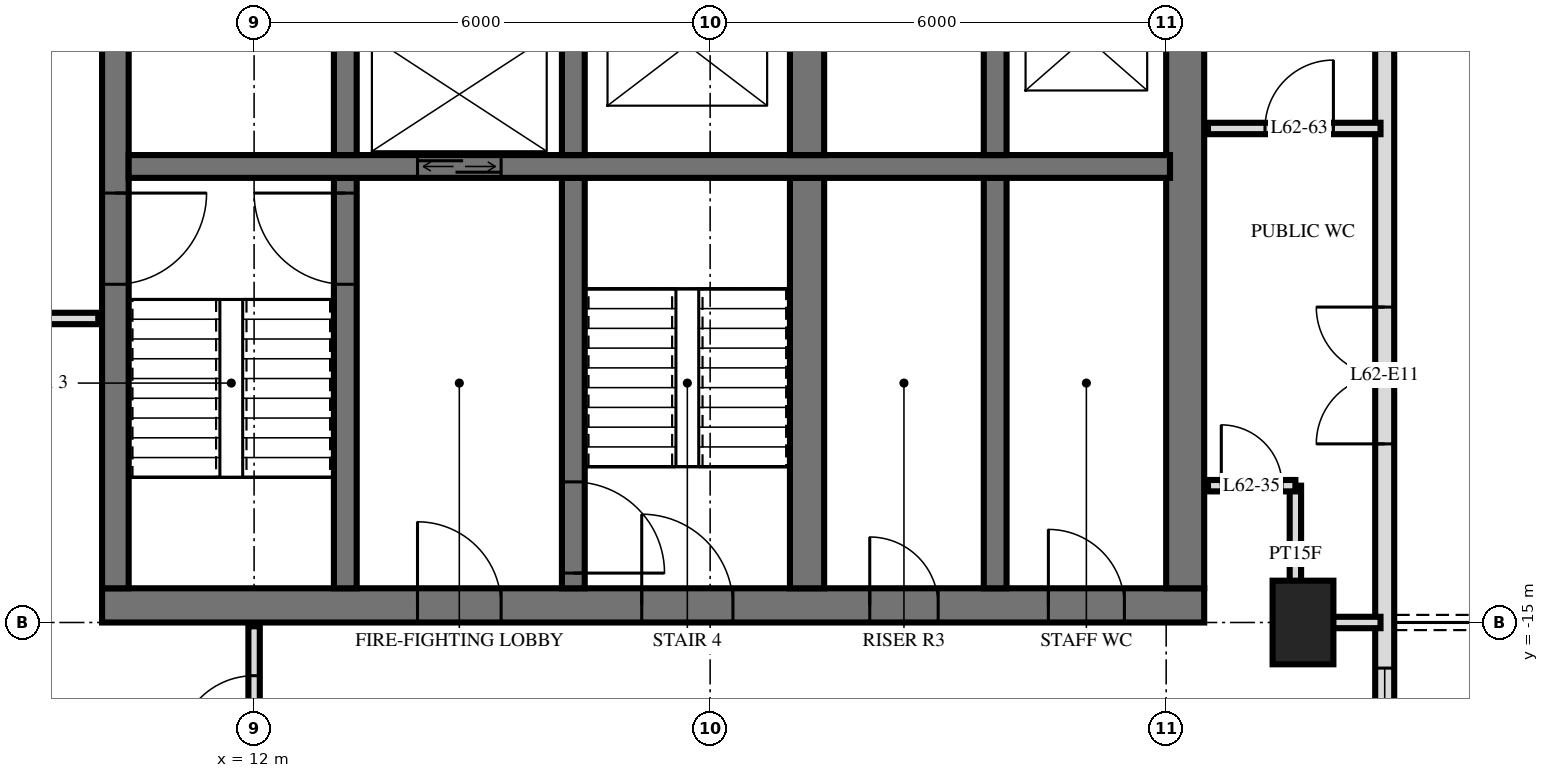
"""IFC4 building model, lengths in metres.
Left out: names, types, materials, properties, quantities, classifications, styles, units other than length and angle.
Written with IfcOpenShell. Run it as: python <this file> out.ifc"""

import sys

from ifc_helpers import new_model, si_unit, direction, frame, frame_2d, origin, origin_2d, place, context, subcontext, project, spatial, rectangle, extrude, element, fill, save


model = new_model("IFC4")
c1 = context("Model", 3, precision=1e-05, world=origin(), true_north=direction((0.0, 1.0)))
c2 = subcontext(c1, "Body", "Model", "MODEL_VIEW")
j1 = project(units=[si_unit("LENGTHUNIT", "METRE"), si_unit("PLANEANGLEUNIT", "RADIAN")], contexts=[c1])
p1 = place(None, origin())
s1 = spatial("IfcSite", under=j1, at=p1, CompositionType="ELEMENT")
p2 = place(p1, origin())
s2 = spatial("IfcBuilding", under=s1, at=p2, CompositionType="ELEMENT")
p3 = place(p2, frame((0.0, 0.0, 236.1)))
s3 = spatial("IfcBuildingStorey", under=s2, at=p3, CompositionType="ELEMENT", Elevation=236.1)
p4 = place(p3, frame((25.8, -15.0, 0.0), z_axis=(0.0, 0.0, 1.0), x_axis=(0.0, 1.0, 0.0)))
e1 = element("IfcColumn", 1, at=p4, inside=s3, PredefinedType="COLUMN", context=c2, shape_type="SweptSolid", body=[
    extrude(rectangle(XDim=1.1, YDim=0.8, at=origin_2d()), origin(), (0.0, 0.0, 1.0), 3.5),
])
p5 = place(p3, frame((10.0, -14.775, 0.0), z_axis=(0.0, 0.0, 1.0), x_axis=(1.0, 0.0, 0.0)))
e2 = element("IfcWall", 2, at=p5, inside=s3, PredefinedType="SHEAR", context=c2, shape_type="SweptSolid", body=[
    extrude(rectangle(XDim=14.5, YDim=0.45, at=frame_2d((7.25, 0.0))), origin(), (0.0, 0.0, 1.0), 3.5),
])
p6 = place(p5, frame((7.1, 0.0, 0.0)))
e3 = element("IfcOpeningElement", 3, at=p6, cuts=e2, PredefinedType="OPENING", context=c2, shape_type="SweptSolid", body=[
    extrude(rectangle(XDim=1.2, YDim=2.1, at=frame_2d((0.6, 1.05))), frame((0.0, 0.235, 0.0), z_axis=(0.0, -1.0, 0.0), x_axis=(1.0, 0.0, 0.0)), (0.0, 0.0, 1.0), 0.47),
])
p7 = place(p5, frame((4.15, 0.0, 0.0)))
e4 = element("IfcOpeningElement", 4, at=p7, cuts=e2, PredefinedType="OPENING", context=c2, shape_type="SweptSolid", body=[
    extrude(rectangle(XDim=1.1, YDim=2.1, at=frame_2d((0.55, 1.05))), frame((0.0, 0.235, 0.0), z_axis=(0.0, -1.0, 0.0), x_axis=(1.0, 0.0, 0.0)), (0.0, 0.0, 1.0), 0.47),
])
p8 = place(p5, frame((10.1, 0.0, 0.0)))
e5 = element("IfcOpeningElement", 5, at=p8, cuts=e2, PredefinedType="OPENING", context=c2, shape_type="SweptSolid", body=[
    extrude(rectangle(XDim=0.9, YDim=2.1, at=frame_2d((0.45, 1.05))), frame((0.0, 0.235, 0.0), z_axis=(0.0, -1.0, 0.0), x_axis=(1.0, 0.0, 0.0)), (0.0, 0.0, 1.0), 0.47),
])
p9 = place(p5, frame((12.45, 0.0, 0.0)))
e6 = element("IfcOpeningElement", 6, at=p9, cuts=e2, PredefinedType="OPENING", context=c2, shape_type="SweptSolid", body=[
    extrude(rectangle(XDim=1.0, YDim=2.1, at=frame_2d((0.5, 1.05))), frame((0.0, 0.235, 0.0), z_axis=(0.0, -1.0, 0.0), x_axis=(1.0, 0.0, 0.0)), (0.0, 0.0, 1.0), 0.47),
])
p10 = place(p3, frame((10.175, -14.55, 0.0), z_axis=(0.0, 0.0, 1.0), x_axis=(0.0, 1.0, 0.0)))
e7 = element("IfcWall", 7, at=p10, inside=s3, PredefinedType="SHEAR", context=c2, shape_type="SweptSolid", body=[
    extrude(rectangle(XDim=14.1, YDim=0.35, at=frame_2d((7.05, 0.0))), origin(), (0.0, 0.0, 1.0), 3.5),
])
p11 = place(p10, frame((8.4, 0.0, 0.0)))
e8 = element("IfcOpeningElement", 8, at=p11, cuts=e7, PredefinedType="OPENING", context=c2, shape_type="SweptSolid", body=[
    extrude(rectangle(XDim=1.4, YDim=2.4, at=frame_2d((0.7, 1.2))), frame((0.0, 0.185, 0.0), z_axis=(0.0, -1.0, 0.0), x_axis=(1.0, 0.0, 0.0)), (0.0, 0.0, 1.0), 0.37),
])
p12 = place(p10, frame((10.0, 0.0, 0.0)))
e9 = element("IfcOpeningElement", 9, at=p12, cuts=e7, PredefinedType="OPENING", context=c2, shape_type="SweptSolid", body=[
    extrude(rectangle(XDim=1.4, YDim=2.4, at=frame_2d((0.7, 1.2))), frame((0.0, 0.185, 0.0), z_axis=(0.0, -1.0, 0.0), x_axis=(1.0, 0.0, 0.0)), (0.0, 0.0, 1.0), 0.37),
])
p13 = place(p10, frame((4.0, 0.0, 0.0)))
e10 = element("IfcOpeningElement", 10, at=p13, cuts=e7, PredefinedType="OPENING", context=c2, shape_type="SweptSolid", body=[
    extrude(rectangle(XDim=1.2, YDim=2.1, at=frame_2d((0.6, 1.05))), frame((0.0, 0.185, 0.0), z_axis=(0.0, -1.0, 0.0), x_axis=(1.0, 0.0, 0.0)), (0.0, 0.0, 1.0), 0.37),
])
p14 = place(p3, frame((24.25, -14.55, 0.0), z_axis=(0.0, 0.0, 1.0), x_axis=(0.0, 1.0, 0.0)))
e11 = element("IfcWall", 11, at=p14, inside=s3, PredefinedType="SHEAR", context=c2, shape_type="SweptSolid", body=[
    extrude(rectangle(XDim=14.1, YDim=0.5, at=frame_2d((7.05, 0.0))), origin(), (0.0, 0.0, 1.0), 3.5),
])
p15 = place(p3, frame((10.35, -9.0, 0.0), z_axis=(0.0, 0.0, 1.0), x_axis=(1.0, 0.0, 0.0)))
e12 = element("IfcWall", 12, at=p15, inside=s3, PredefinedType="SHEAR", context=c2, shape_type="SweptSolid", body=[
    extrude(rectangle(XDim=13.7, YDim=0.3, at=frame_2d((6.85, 0.0))), origin(), (0.0, 0.0, 1.0), 3.5),
])
p16 = place(p15, frame((3.8, 0.0, 0.0)))
e13 = element("IfcOpeningElement", 13, at=p16, cuts=e12, PredefinedType="OPENING", context=c2, shape_type="SweptSolid", body=[
    extrude(rectangle(XDim=1.1, YDim=2.1, at=frame_2d((0.55, 1.05))), frame((0.0, 0.16, 0.0), z_axis=(0.0, -1.0, 0.0), x_axis=(1.0, 0.0, 0.0)), (0.0, 0.0, 1.0), 0.32),
])
p17 = place(p3, frame((13.2, -8.85, 0.0), z_axis=(0.0, 0.0, 1.0), x_axis=(0.0, 1.0, 0.0)))
e14 = element("IfcWall", 14, at=p17, inside=s3, PredefinedType="SHEAR", context=c2, shape_type="SweptSolid", body=[
    extrude(rectangle(XDim=2.3, YDim=0.3, at=frame_2d((1.15, 0.0))), origin(), (0.0, 0.0, 1.0), 3.5),
])
p18 = place(p3, frame((13.2, -14.55, 0.0), z_axis=(0.0, 0.0, 1.0), x_axis=(0.0, 1.0, 0.0)))
e15 = element("IfcWall", 15, at=p18, inside=s3, PredefinedType="SHEAR", context=c2, shape_type="SweptSolid", body=[
    extrude(rectangle(XDim=5.4, YDim=0.3, at=frame_2d((2.7, 0.0))), origin(), (0.0, 0.0, 1.0), 3.5),
])
p19 = place(p18, frame((4.0, 0.0, 0.0)))
e16 = element("IfcOpeningElement", 16, at=p19, cuts=e15, PredefinedType="OPENING", context=c2, shape_type="SweptSolid", body=[
    extrude(rectangle(XDim=1.2, YDim=2.1, at=frame_2d((0.6, 1.05))), frame((0.0, 0.16, 0.0), z_axis=(0.0, -1.0, 0.0), x_axis=(1.0, 0.0, 0.0)), (0.0, 0.0, 1.0), 0.32),
])
p20 = place(p3, frame((16.2, -8.85, 0.0), z_axis=(0.0, 0.0, 1.0), x_axis=(0.0, 1.0, 0.0)))
e17 = element("IfcWall", 17, at=p20, inside=s3, PredefinedType="SHEAR", context=c2, shape_type="SweptSolid", body=[
    extrude(rectangle(XDim=2.3, YDim=0.3, at=frame_2d((1.15, 0.0))), origin(), (0.0, 0.0, 1.0), 3.5),
])
p21 = place(p3, frame((16.2, -14.55, 0.0), z_axis=(0.0, 0.0, 1.0), x_axis=(0.0, 1.0, 0.0)))
e18 = element("IfcWall", 18, at=p21, inside=s3, PredefinedType="SHEAR", context=c2, shape_type="SweptSolid", body=[
    extrude(rectangle(XDim=5.4, YDim=0.3, at=frame_2d((2.7, 0.0))), origin(), (0.0, 0.0, 1.0), 3.5),
])
p22 = place(p21, frame((0.2, 0.0, 0.0)))
e19 = element("IfcOpeningElement", 19, at=p22, cuts=e18, PredefinedType="OPENING", context=c2, shape_type="SweptSolid", body=[
    extrude(rectangle(XDim=1.2, YDim=2.1, at=frame_2d((0.6, 1.05))), frame((0.0, 0.16, 0.0), z_axis=(0.0, -1.0, 0.0), x_axis=(1.0, 0.0, 0.0)), (0.0, 0.0, 1.0), 0.32),
])
p23 = place(p3, frame((19.275, -8.85, 0.0), z_axis=(0.0, 0.0, 1.0), x_axis=(0.0, 1.0, 0.0)))
e20 = element("IfcWall", 20, at=p23, inside=s3, PredefinedType="SHEAR", context=c2, shape_type="SweptSolid", body=[
    extrude(rectangle(XDim=2.3, YDim=0.45, at=frame_2d((1.15, 0.0))), origin(), (0.0, 0.0, 1.0), 3.5),
])
p24 = place(p3, frame((19.275, -14.55, 0.0), z_axis=(0.0, 0.0, 1.0), x_axis=(0.0, 1.0, 0.0)))
e21 = element("IfcWall", 21, at=p24, inside=s3, PredefinedType="SHEAR", context=c2, shape_type="SweptSolid", body=[
    extrude(rectangle(XDim=5.4, YDim=0.45, at=frame_2d((2.7, 0.0))), origin(), (0.0, 0.0, 1.0), 3.5),
])
p25 = place(p3, frame((21.75, -8.85, 0.0), z_axis=(0.0, 0.0, 1.0), x_axis=(0.0, 1.0, 0.0)))
e22 = element("IfcWall", 22, at=p25, inside=s3, PredefinedType="SHEAR", context=c2, shape_type="SweptSolid", body=[
    extrude(rectangle(XDim=2.3, YDim=0.3, at=frame_2d((1.15, 0.0))), origin(), (0.0, 0.0, 1.0), 3.5),
])
p26 = place(p3, frame((21.75, -14.55, 0.0), z_axis=(0.0, 0.0, 1.0), x_axis=(0.0, 1.0, 0.0)))
e23 = element("IfcWall", 23, at=p26, inside=s3, PredefinedType="SHEAR", context=c2, shape_type="SweptSolid", body=[
    extrude(rectangle(XDim=5.4, YDim=0.3, at=frame_2d((2.7, 0.0))), origin(), (0.0, 0.0, 1.0), 3.5),
])
p27 = place(p3, frame((26.875, -24.875, 0.0), z_axis=(0.0, 0.0, 1.0), x_axis=(0.0, 1.0, 0.0)))
e24 = element("IfcWall", 24, at=p27, inside=s3, PredefinedType="SOLIDWALL", context=c2, shape_type="SweptSolid", body=[
    extrude(rectangle(XDim=21.551, YDim=0.25, at=frame_2d((10.775, 0.0))), origin(), (0.0, 0.0, 1.0), 3.22),
])
p28 = place(p27, frame((0.575, 0.0, 0.0)))
e25 = element("IfcOpeningElement", 25, at=p28, cuts=e24, PredefinedType="OPENING", context=c2, shape_type="SweptSolid", body=[
    extrude(rectangle(XDim=1.8, YDim=2.4, at=frame_2d((0.9, 1.2))), frame((0.0, 0.135, 0.0), z_axis=(0.0, -1.0, 0.0), x_axis=(1.0, 0.0, 0.0)), (0.0, 0.0, 1.0), 0.27),
])
p29 = place(p27, frame((4.475, 0.0, 0.0)))
e26 = element("IfcOpeningElement", 26, at=p29, cuts=e24, PredefinedType="OPENING", context=c2, shape_type="SweptSolid", body=[
    extrude(rectangle(XDim=1.8, YDim=2.4, at=frame_2d((0.9, 1.2))), frame((0.0, 0.135, 0.0), z_axis=(0.0, -1.0, 0.0), x_axis=(1.0, 0.0, 0.0)), (0.0, 0.0, 1.0), 0.27),
])
p30 = place(p27, frame((8.075, 0.0, 0.9)))
e27 = element("IfcOpeningElement", 27, at=p30, cuts=e24, PredefinedType="OPENING", context=c2, shape_type="SweptSolid", body=[
    extrude(rectangle(XDim=1.2, YDim=1.5, at=frame_2d((0.6, 0.75))), frame((0.0, 0.135, 0.0), z_axis=(0.0, -1.0, 0.0), x_axis=(1.0, 0.0, 0.0)), (0.0, 0.0, 1.0), 0.27),
])
p31 = place(p27, frame((12.225, 0.0, 0.0)))
e28 = element("IfcOpeningElement", 28, at=p31, cuts=e24, PredefinedType="OPENING", context=c2, shape_type="SweptSolid", body=[
    extrude(rectangle(XDim=1.8, YDim=2.4, at=frame_2d((0.9, 1.2))), frame((0.0, 0.135, 0.0), z_axis=(0.0, -1.0, 0.0), x_axis=(1.0, 0.0, 0.0)), (0.0, 0.0, 1.0), 0.27),
])
p32 = place(p3, frame((25.7, -15.0, 0.0), z_axis=(0.0, 0.0, 1.0), x_axis=(0.0, 1.0, 0.0)))
e29 = element("IfcWall", 29, at=p32, inside=s3, PredefinedType="PARTITIONING", context=c2, shape_type="SweptSolid", body=[
    extrude(rectangle(XDim=1.8, YDim=0.15, at=frame_2d((0.9, 0.0))), origin(), (0.0, 0.0, 1.0), 3.22),
])
p33 = place(p3, frame((12.0, -17.4, 0.0), z_axis=(0.0, 0.0, 1.0), x_axis=(0.0, 1.0, 0.0)))
e30 = element("IfcWall", 30, at=p33, inside=s3, PredefinedType="PARTITIONING", context=c2, shape_type="SweptSolid", body=[
    extrude(rectangle(XDim=2.35, YDim=0.15, at=frame_2d((1.175, 0.0))), origin(), (0.0, 0.0, 1.0), 3.22),
])
p34 = place(p33, frame((0.7, 0.0, 0.0)))
e31 = element("IfcOpeningElement", 31, at=p34, cuts=e30, PredefinedType="OPENING", context=c2, shape_type="SweptSolid", body=[
    extrude(rectangle(XDim=1.0, YDim=2.1, at=frame_2d((0.5, 1.05))), frame((0.0, 0.085, 0.0), z_axis=(0.0, -1.0, 0.0), x_axis=(1.0, 0.0, 0.0)), (0.0, 0.0, 1.0), 0.17),
])
p35 = place(p3, frame((25.7, -15.0, 0.0), z_axis=(0.0, 0.0, 1.0), x_axis=(1.0, 0.0, 0.0)))
e32 = element("IfcWall", 32, at=p35, inside=s3, PredefinedType="PARTITIONING", context=c2, shape_type="SweptSolid", body=[
    extrude(rectangle(XDim=1.12, YDim=0.15, at=frame_2d((0.56, 0.0))), origin(), (0.0, 0.0, 1.0), 3.22),
])
p36 = place(p3, frame((24.55, -13.2, 0.0), z_axis=(0.0, 0.0, 1.0), x_axis=(1.0, 0.0, 0.0)))
e33 = element("IfcWall", 33, at=p36, inside=s3, PredefinedType="PARTITIONING", context=c2, shape_type="SweptSolid", body=[
    extrude(rectangle(XDim=1.15, YDim=0.15, at=frame_2d((0.575, 0.0))), origin(), (0.0, 0.0, 1.0), 3.22),
])
p37 = place(p36, frame((0.175, 0.0, 0.0)))
e34 = element("IfcOpeningElement", 34, at=p37, cuts=e33, PredefinedType="OPENING", context=c2, shape_type="SweptSolid", body=[
    extrude(rectangle(XDim=0.8, YDim=2.1, at=frame_2d((0.4, 1.05))), frame((0.0, 0.085, 0.0), z_axis=(0.0, -1.0, 0.0), x_axis=(1.0, 0.0, 0.0)), (0.0, 0.0, 1.0), 0.17),
])
p38 = place(p3, frame((-9.95, -11.0, 0.0), z_axis=(0.0, 0.0, 1.0), x_axis=(1.0, 0.0, 0.0)))
e35 = element("IfcWall", 35, at=p38, inside=s3, PredefinedType="PARTITIONING", context=c2, shape_type="SweptSolid", body=[
    extrude(rectangle(XDim=19.9, YDim=0.15, at=frame_2d((9.95, 0.0))), origin(), (0.0, 0.0, 1.0), 3.22),
])
p39 = place(p38, frame((9.45, 0.0, 0.0)))
e36 = element("IfcOpeningElement", 36, at=p39, cuts=e35, PredefinedType="OPENING", context=c2, shape_type="SweptSolid", body=[
    extrude(rectangle(XDim=1.0, YDim=2.1, at=frame_2d((0.5, 1.05))), frame((0.0, 0.085, 0.0), z_axis=(0.0, -1.0, 0.0), x_axis=(1.0, 0.0, 0.0)), (0.0, 0.0, 1.0), 0.17),
])
p40 = place(p38, frame((3.45, 0.0, 0.0)))
e37 = element("IfcOpeningElement", 37, at=p40, cuts=e35, PredefinedType="OPENING", context=c2, shape_type="SweptSolid", body=[
    extrude(rectangle(XDim=1.0, YDim=2.1, at=frame_2d((0.5, 1.05))), frame((0.0, 0.085, 0.0), z_axis=(0.0, -1.0, 0.0), x_axis=(1.0, 0.0, 0.0)), (0.0, 0.0, 1.0), 0.17),
])
p41 = place(p3, frame((24.55, -8.5, 0.0), z_axis=(0.0, 0.0, 1.0), x_axis=(1.0, 0.0, 0.0)))
e38 = element("IfcWall", 38, at=p41, inside=s3, PredefinedType="PLUMBINGWALL", context=c2, shape_type="SweptSolid", body=[
    extrude(rectangle(XDim=2.27, YDim=0.15, at=frame_2d((1.135, 0.0))), origin(), (0.0, 0.0, 1.0), 3.22),
])
p42 = place(p41, frame((0.75, 0.0, 0.0)))
e39 = element("IfcOpeningElement", 39, at=p42, cuts=e38, PredefinedType="OPENING", context=c2, shape_type="SweptSolid", body=[
    extrude(rectangle(XDim=0.9, YDim=2.1, at=frame_2d((0.45, 1.05))), frame((0.0, 0.085, 0.0), z_axis=(0.0, -1.0, 0.0), x_axis=(1.0, 0.0, 0.0)), (0.0, 0.0, 1.0), 0.17),
])
p43 = place(p30, origin())
e40 = element("IfcWindow", 40, at=p43, inside=s3, PartitioningType="SINGLE_PANEL", PredefinedType="WINDOW", context=c2, shape_type="SweptSolid", body=[
    extrude(rectangle(XDim=1.2, YDim=1.5, at=frame_2d((0.6, 0.75))), frame((0.0, 0.03, 0.0), z_axis=(0.0, -1.0, 0.0), x_axis=(1.0, 0.0, 0.0)), (0.0, 0.0, 1.0), 0.06),
])
fill(e27, e40)
p44 = place(p31, origin())
e41 = element("IfcDoor", 41, at=p44, inside=s3, OperationType="DOUBLE_DOOR_SINGLE_SWING", PredefinedType="DOOR", context=c2, shape_type="SweptSolid", body=[
    extrude(rectangle(XDim=1.8, YDim=2.4, at=frame_2d((0.9, 1.2))), frame((0.0, 0.025, 0.0), z_axis=(0.0, -1.0, 0.0), x_axis=(1.0, 0.0, 0.0)), (0.0, 0.0, 1.0), 0.05),
])
fill(e28, e41)
p45 = place(p16, origin())
e42 = element("IfcDoor", 42, at=p45, inside=s3, OperationType="DOUBLE_DOOR_SLIDING", PredefinedType="USERDEFINED", context=c2, shape_type="SweptSolid", body=[
    extrude(rectangle(XDim=1.1, YDim=2.1, at=frame_2d((0.55, 1.05))), frame((0.0, 0.025, 0.0), z_axis=(0.0, -1.0, 0.0), x_axis=(1.0, 0.0, 0.0)), (0.0, 0.0, 1.0), 0.05),
])
fill(e13, e42)
p46 = place(p13, frame((0.6, 0.0, 0.0), z_axis=(0.0, 0.0, 1.0), x_axis=(-1.0, 0.0, 0.0)))
e43 = element("IfcDoor", 43, at=p46, inside=s3, OperationType="SINGLE_SWING_RIGHT", PredefinedType="DOOR", context=c2, shape_type="SweptSolid", body=[
    extrude(rectangle(XDim=1.2, YDim=2.1, at=frame_2d((0.0, 1.05))), frame((0.0, -0.025, 0.0), z_axis=(0.0, 1.0, 0.0), x_axis=(-1.0, 0.0, 0.0)), (0.0, 0.0, 1.0), 0.05),
])
fill(e10, e43)
p47 = place(p6, origin())
e44 = element("IfcDoor", 44, at=p47, inside=s3, OperationType="SINGLE_SWING_RIGHT", PredefinedType="DOOR", context=c2, shape_type="SweptSolid", body=[
    extrude(rectangle(XDim=1.2, YDim=2.1, at=frame_2d((0.6, 1.05))), frame((0.0, 0.025, 0.0), z_axis=(0.0, -1.0, 0.0), x_axis=(1.0, 0.0, 0.0)), (0.0, 0.0, 1.0), 0.05),
])
fill(e3, e44)
p48 = place(p7, origin())
e45 = element("IfcDoor", 45, at=p48, inside=s3, OperationType="SINGLE_SWING_RIGHT", PredefinedType="DOOR", context=c2, shape_type="SweptSolid", body=[
    extrude(rectangle(XDim=1.1, YDim=2.1, at=frame_2d((0.55, 1.05))), frame((0.0, 0.025, 0.0), z_axis=(0.0, -1.0, 0.0), x_axis=(1.0, 0.0, 0.0)), (0.0, 0.0, 1.0), 0.05),
])
fill(e4, e45)
p49 = place(p8, origin())
e46 = element("IfcDoor", 46, at=p49, inside=s3, OperationType="SINGLE_SWING_RIGHT", PredefinedType="DOOR", context=c2, shape_type="SweptSolid", body=[
    extrude(rectangle(XDim=0.9, YDim=2.1, at=frame_2d((0.45, 1.05))), frame((0.0, 0.025, 0.0), z_axis=(0.0, -1.0, 0.0), x_axis=(1.0, 0.0, 0.0)), (0.0, 0.0, 1.0), 0.05),
])
fill(e5, e46)
p50 = place(p9, origin())
e47 = element("IfcDoor", 47, at=p50, inside=s3, OperationType="SINGLE_SWING_RIGHT", PredefinedType="DOOR", context=c2, shape_type="SweptSolid", body=[
    extrude(rectangle(XDim=1.0, YDim=2.1, at=frame_2d((0.5, 1.05))), frame((0.0, 0.025, 0.0), z_axis=(0.0, -1.0, 0.0), x_axis=(1.0, 0.0, 0.0)), (0.0, 0.0, 1.0), 0.05),
])
fill(e6, e47)
p51 = place(p19, origin())
e48 = element("IfcDoor", 48, at=p51, inside=s3, OperationType="SINGLE_SWING_LEFT", PredefinedType="DOOR", context=c2, shape_type="SweptSolid", body=[
    extrude(rectangle(XDim=1.2, YDim=2.1, at=frame_2d((0.6, 1.05))), frame((0.0, 0.025, 0.0), z_axis=(0.0, -1.0, 0.0), x_axis=(1.0, 0.0, 0.0)), (0.0, 0.0, 1.0), 0.05),
])
fill(e16, e48)
p52 = place(p22, frame((0.6, 0.0, 0.0), z_axis=(0.0, 0.0, 1.0), x_axis=(-1.0, 0.0, 0.0)))
e49 = element("IfcDoor", 49, at=p52, inside=s3, OperationType="SINGLE_SWING_LEFT", PredefinedType="DOOR", context=c2, shape_type="SweptSolid", body=[
    extrude(rectangle(XDim=1.2, YDim=2.1, at=frame_2d((0.0, 1.05))), frame((0.0, -0.025, 0.0), z_axis=(0.0, 1.0, 0.0), x_axis=(-1.0, 0.0, 0.0)), (0.0, 0.0, 1.0), 0.05),
])
fill(e19, e49)
p53 = place(p34, origin())
e50 = element("IfcDoor", 50, at=p53, inside=s3, OperationType="SINGLE_SWING_RIGHT", PredefinedType="DOOR", context=c2, shape_type="SweptSolid", body=[
    extrude(rectangle(XDim=1.0, YDim=2.1, at=frame_2d((0.5, 1.05))), frame((0.0, 0.025, 0.0), z_axis=(0.0, -1.0, 0.0), x_axis=(1.0, 0.0, 0.0)), (0.0, 0.0, 1.0), 0.05),
])
fill(e31, e50)
p54 = place(p37, origin())
e51 = element("IfcDoor", 51, at=p54, inside=s3, OperationType="SINGLE_SWING_RIGHT", PredefinedType="DOOR", context=c2, shape_type="SweptSolid", body=[
    extrude(rectangle(XDim=0.8, YDim=2.1, at=frame_2d((0.4, 1.05))), frame((0.0, 0.025, 0.0), z_axis=(0.0, -1.0, 0.0), x_axis=(1.0, 0.0, 0.0)), (0.0, 0.0, 1.0), 0.05),
])
fill(e34, e51)
p55 = place(p42, origin())
e52 = element("IfcDoor", 52, at=p55, inside=s3, OperationType="SINGLE_SWING_LEFT", PredefinedType="DOOR", context=c2, shape_type="SweptSolid", body=[
    extrude(rectangle(XDim=0.9, YDim=2.1, at=frame_2d((0.45, 1.05))), frame((0.0, 0.025, 0.0), z_axis=(0.0, -1.0, 0.0), x_axis=(1.0, 0.0, 0.0)), (0.0, 0.0, 1.0), 0.05),
])
fill(e39, e52)
save(model, sys.argv[1])
